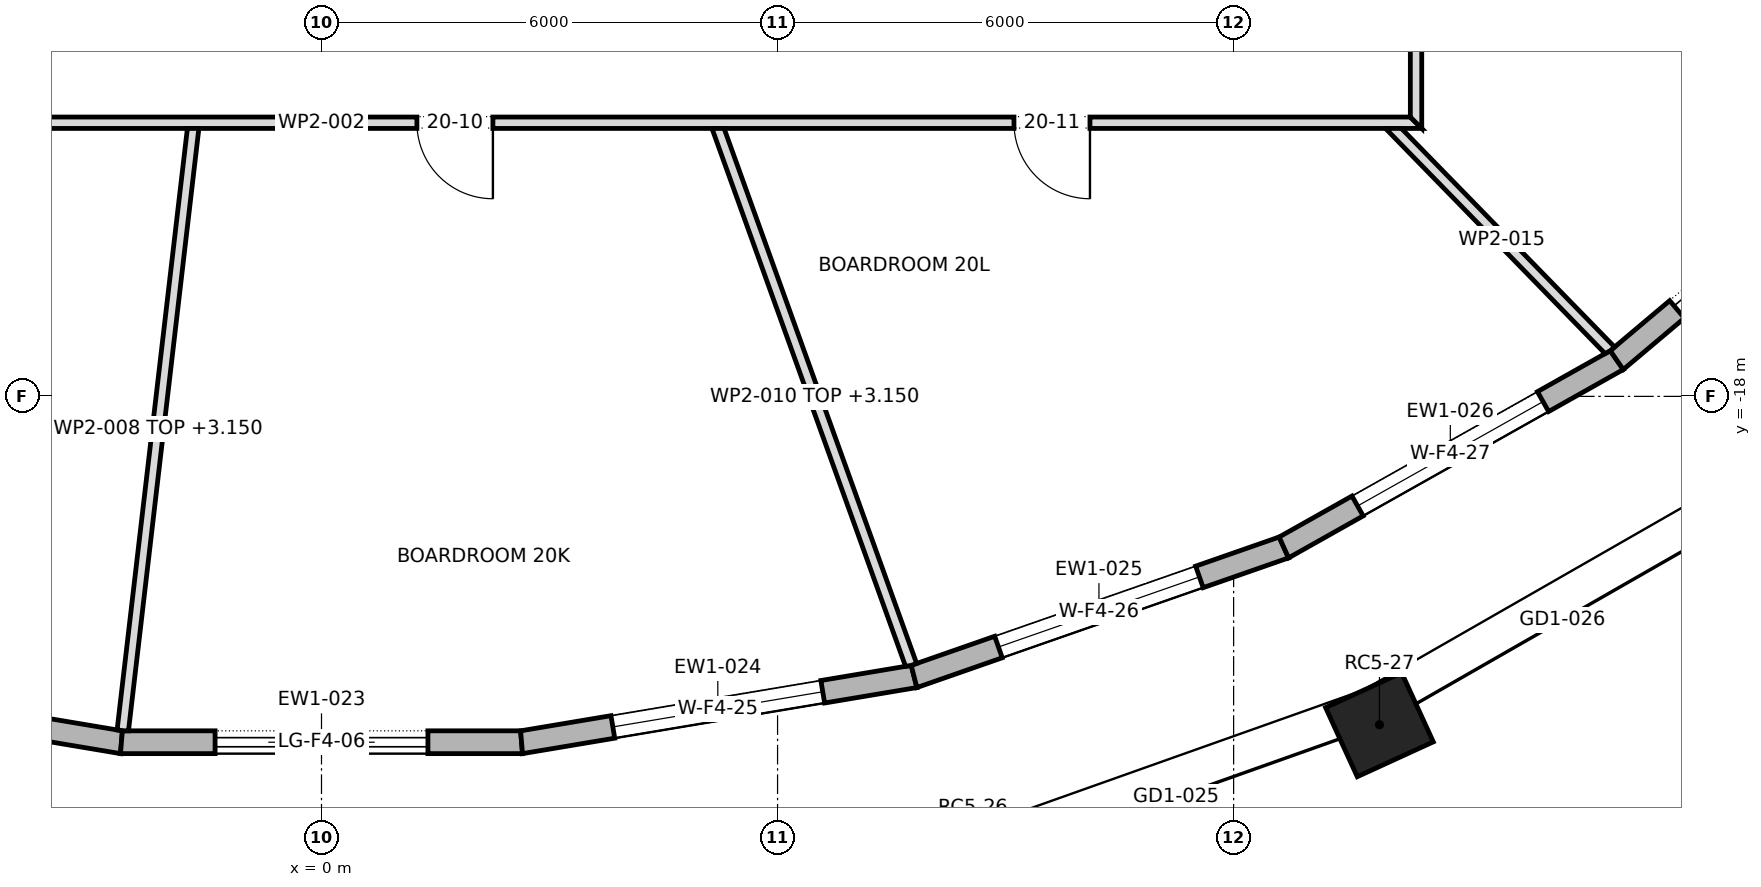
"""IFC4 building model, lengths in metres.
Left out: names, types, materials, properties, quantities, classifications, styles, units other than length and angle.
Written with IfcOpenShell. Run it as: python <this file> out.ifc"""

import sys

from ifc_helpers import new_model, si_unit, direction, frame, frame_2d, origin, origin_2d, place, context, subcontext, project, spatial, polyline, rectangle, outline, extrude, element, fill, save


model = new_model("IFC4")
c1 = context("Model", 3, precision=1e-05, world=origin(), true_north=direction((0.0, 1.0)))
c2 = subcontext(c1, "Body", "Model", "MODEL_VIEW")
j1 = project(units=[si_unit("LENGTHUNIT", "METRE"), si_unit("PLANEANGLEUNIT", "RADIAN")], contexts=[c1])
p1 = place(None, origin())
s1 = spatial("IfcSite", under=j1, at=p1, CompositionType="ELEMENT")
p2 = place(p1, origin())
s2 = spatial("IfcBuilding", under=s1, at=p2, CompositionType="ELEMENT")
p3 = place(p2, frame((0.0, 0.0, 280.3)))
s3 = spatial("IfcBuildingStorey", under=s2, at=p3, CompositionType="ELEMENT", Elevation=280.3)
p4 = place(p3, frame((13.919, -22.32, 0.0), z_axis=(0.0, 0.0, 1.0), x_axis=(0.909129276708, 0.416514055265, 0.0)))
e1 = element("IfcColumn", 1, at=p4, inside=s3, PredefinedType="COLUMN", context=c2, shape_type="SweptSolid", body=[
    extrude(rectangle(XDim=1.1, YDim=1.0, at=origin_2d()), origin(), (0.0, 0.0, 1.0), 4.0),
])
p5 = place(p3, frame((-7.796, -21.685, 0.0), z_axis=(0.0, 0.0, 1.0), x_axis=(0.986257472007, -0.165215613396, 0.0)))
e2 = element("IfcWall", 2, at=p5, inside=s3, PredefinedType="STANDARD", context=c2, shape_type="SweptSolid", body=[
    extrude(outline(polyline([(-0.013, -0.15), (5.248, -0.15), (5.223, 0.15), (0.013, 0.15), (-0.013, -0.15)])), origin(), (0.0, 0.0, 1.0), 3.7),
])
p6 = place(p5, frame((1.218, 0.0, 0.6)))
e3 = element("IfcOpeningElement", 3, at=p6, cuts=e2, PredefinedType="OPENING", context=c2, shape_type="SweptSolid", body=[
    extrude(rectangle(XDim=2.8, YDim=2.65, at=frame_2d((1.4, 1.325))), frame((0.0, 0.162, 0.0), z_axis=(0.0, -1.0, 0.0), x_axis=(1.0, 0.0, 0.0)), (0.0, 0.0, 1.0), 0.324),
])
p7 = place(p3, frame((-2.632, -22.55, 0.0), z_axis=(0.0, 0.0, 1.0), x_axis=(1.0, 0.0, 0.0)))
e4 = element("IfcWall", 4, at=p7, inside=s3, PredefinedType="STANDARD", context=c2, shape_type="SweptSolid", body=[
    extrude(outline(polyline([(-0.012, -0.15), (5.277, -0.15), (5.252, 0.15), (0.012, 0.15), (-0.012, -0.15)])), origin(), (0.0, 0.0, 1.0), 3.7),
])
p8 = place(p7, frame((1.232, 0.0, 0.0)))
e5 = element("IfcOpeningElement", 5, at=p8, cuts=e4, PredefinedType="OPENING", context=c2, shape_type="SweptSolid", body=[
    extrude(rectangle(XDim=2.8, YDim=3.25, at=frame_2d((1.4, 1.625))), frame((0.0, 0.162, 0.0), z_axis=(0.0, -1.0, 0.0), x_axis=(1.0, 0.0, 0.0)), (0.0, 0.0, 1.0), 0.324),
])
p9 = place(p3, frame((2.632, -22.55, 0.0), z_axis=(0.0, 0.0, 1.0), x_axis=(0.986257472007, 0.165215613396, 0.0)))
e6 = element("IfcWall", 6, at=p9, inside=s3, PredefinedType="STANDARD", context=c2, shape_type="SweptSolid", body=[
    extrude(outline(polyline([(-0.012, -0.15), (5.248, -0.15), (5.223, 0.15), (0.012, 0.15), (-0.012, -0.15)])), origin(), (0.0, 0.0, 1.0), 3.7),
])
p10 = place(p9, frame((1.218, 0.0, 0.6)))
e7 = element("IfcOpeningElement", 7, at=p10, cuts=e6, PredefinedType="OPENING", context=c2, shape_type="SweptSolid", body=[
    extrude(rectangle(XDim=2.8, YDim=2.65, at=frame_2d((1.4, 1.325))), frame((0.0, 0.162, 0.0), z_axis=(0.0, -1.0, 0.0), x_axis=(1.0, 0.0, 0.0)), (0.0, 0.0, 1.0), 0.324),
])
p11 = place(p3, frame((7.796, -21.685, 0.0), z_axis=(0.0, 0.0, 1.0), x_axis=(0.944204293701, 0.329360367617, 0.0)))
e8 = element("IfcWall", 8, at=p11, inside=s3, PredefinedType="STANDARD", context=c2, shape_type="SweptSolid", body=[
    extrude(outline(polyline([(-0.013, -0.15), (5.166, -0.15), (5.139, 0.15), (0.013, 0.15), (-0.013, -0.15)])), origin(), (0.0, 0.0, 1.0), 3.7),
])
p12 = place(p11, frame((1.176, 0.0, 0.6)))
e9 = element("IfcOpeningElement", 9, at=p12, cuts=e8, PredefinedType="OPENING", context=c2, shape_type="SweptSolid", body=[
    extrude(rectangle(XDim=2.8, YDim=2.65, at=frame_2d((1.4, 1.325))), frame((0.0, 0.162, 0.0), z_axis=(0.0, -1.0, 0.0), x_axis=(1.0, 0.0, 0.0)), (0.0, 0.0, 1.0), 0.324),
])
p13 = place(p3, frame((12.661, -19.988, 0.0), z_axis=(0.0, 0.0, 1.0), x_axis=(0.871488606878, 0.490415750239, 0.0)))
e10 = element("IfcWall", 10, at=p13, inside=s3, PredefinedType="STANDARD", context=c2, shape_type="SweptSolid", body=[
    extrude(outline(polyline([(-0.013, -0.15), (5.04, -0.15), (5.012, 0.15), (0.013, 0.15), (-0.013, -0.15)])), origin(), (0.0, 0.0, 1.0), 3.7),
])
p14 = place(p13, frame((1.113, 0.0, 0.6)))
e11 = element("IfcOpeningElement", 11, at=p14, cuts=e10, PredefinedType="OPENING", context=c2, shape_type="SweptSolid", body=[
    extrude(rectangle(XDim=2.8, YDim=2.65, at=frame_2d((1.4, 1.325))), frame((0.0, 0.162, 0.0), z_axis=(0.0, -1.0, 0.0), x_axis=(1.0, 0.0, 0.0)), (0.0, 0.0, 1.0), 0.324),
])
p15 = place(p3, frame((17.041, -17.523, 0.0), z_axis=(0.0, 0.0, 1.0), x_axis=(0.764876116592, 0.644177402792, 0.0)))
e12 = element("IfcWall", 12, at=p15, inside=s3, PredefinedType="STANDARD", context=c2, shape_type="SweptSolid", body=[
    extrude(outline(polyline([(-0.014, -0.15), (4.888, -0.15), (4.858, 0.15), (0.014, 0.15), (-0.014, -0.15)])), origin(), (0.0, 0.0, 1.0), 3.7),
])
p16 = place(p15, frame((1.036, 0.0, 0.0)))
e13 = element("IfcOpeningElement", 13, at=p16, cuts=e12, PredefinedType="OPENING", context=c2, shape_type="SweptSolid", body=[
    extrude(rectangle(XDim=2.8, YDim=3.25, at=frame_2d((1.4, 1.625))), frame((0.0, 0.162, 0.0), z_axis=(0.0, -1.0, 0.0), x_axis=(1.0, 0.0, 0.0)), (0.0, 0.0, 1.0), 0.324),
])
p17 = place(p3, frame((-14.475, -14.4, 0.0), z_axis=(0.0, 0.0, 1.0), x_axis=(1.0, 0.0, 0.0)))
e14 = element("IfcWall", 14, at=p17, inside=s3, PredefinedType="PARTITIONING", context=c2, shape_type="SweptSolid", body=[
    extrude(outline(polyline([(0.0, -0.075), (1.93, -0.075), (3.86, -0.075), (5.79, -0.075), (7.72, -0.075), (9.65, -0.075), (11.58, -0.075), (13.51, -0.075), (15.44, -0.075), (17.37, -0.075), (19.3, -0.075), (21.23, -0.075), (23.16, -0.075), (25.09, -0.075), (27.02, -0.075), (28.95, -0.075), (28.8, 0.075), (26.89, 0.075), (24.98, 0.075), (23.07, 0.075), (21.16, 0.075), (19.25, 0.075), (17.34, 0.075), (15.43, 0.075), (13.52, 0.075), (11.61, 0.075), (9.7, 0.075), (7.79, 0.075), (5.88, 0.075), (3.97, 0.075), (2.06, 0.075), (0.15, 0.075), (0.0, -0.075)])), origin(), (0.0, 0.0, 1.0), 3.7),
])
p18 = place(p17, frame((5.535, 0.0, 0.0)))
e15 = element("IfcOpeningElement", 15, at=p18, cuts=e14, PredefinedType="OPENING", context=c2, shape_type="SweptSolid", body=[
    extrude(rectangle(XDim=1.8, YDim=2.1, at=frame_2d((0.9, 1.05))), frame((0.0, 0.087, 0.0), z_axis=(0.0, -1.0, 0.0), x_axis=(1.0, 0.0, 0.0)), (0.0, 0.0, 1.0), 0.174),
])
p19 = place(p17, frame((15.73, 0.0, 0.0)))
e16 = element("IfcOpeningElement", 16, at=p19, cuts=e14, PredefinedType="OPENING", context=c2, shape_type="SweptSolid", body=[
    extrude(rectangle(XDim=1.0, YDim=2.1, at=frame_2d((0.5, 1.05))), frame((0.0, 0.087, 0.0), z_axis=(0.0, -1.0, 0.0), x_axis=(1.0, 0.0, 0.0)), (0.0, 0.0, 1.0), 0.174),
])
p20 = place(p17, frame((23.585, 0.0, 0.0)))
e17 = element("IfcOpeningElement", 17, at=p20, cuts=e14, PredefinedType="OPENING", context=c2, shape_type="SweptSolid", body=[
    extrude(rectangle(XDim=1.0, YDim=2.1, at=frame_2d((0.5, 1.05))), frame((0.0, 0.087, 0.0), z_axis=(0.0, -1.0, 0.0), x_axis=(1.0, 0.0, 0.0)), (0.0, 0.0, 1.0), 0.174),
])
p21 = place(p3, frame((-1.688, -14.467, 0.0), z_axis=(0.0, 0.0, 1.0), x_axis=(-0.116071250105, -0.993240889663, 0.0)))
e18 = element("IfcWall", 18, at=p21, inside=s3, PredefinedType="PARTITIONING", context=c2, shape_type="SweptSolid", body=[
    extrude(outline(polyline([(7.984, -0.075), (7.984, 0.025), (7.979, 0.075), (5.984, 0.075), (3.989, 0.075), (1.995, 0.075), (0.0, 0.075), (0.0, 0.073), (0.017, -0.075), (2.009, -0.075), (4.001, -0.075), (5.993, -0.075), (7.984, -0.075)])), origin(), (0.0, 0.0, 1.0), 3.15),
])
p22 = place(p3, frame((5.208, -14.45, 0.0), z_axis=(0.0, 0.0, 1.0), x_axis=(0.338585214783, -0.940935732306, 0.0)))
e19 = element("IfcWall", 19, at=p22, inside=s3, PredefinedType="PARTITIONING", context=c2, shape_type="SweptSolid", body=[
    extrude(outline(polyline([(0.0, -0.075), (1.88, -0.075), (3.76, -0.075), (5.64, -0.075), (7.521, -0.075), (7.534, -0.001), (7.534, 0.055), (7.534, 0.075), (5.664, 0.075), (3.794, 0.075), (1.924, 0.075), (0.054, 0.075), (0.0, -0.074), (0.0, -0.075)])), origin(), (0.0, 0.0, 1.0), 3.15),
])
p23 = place(p3, frame((14.4, -14.475, 0.0), z_axis=(0.0, 0.0, 1.0), x_axis=(0.0, 1.0, 0.0)))
e20 = element("IfcWall", 20, at=p23, inside=s3, PredefinedType="PARTITIONING", context=c2, shape_type="SweptSolid", body=[
    extrude(outline(polyline([(0.0, -0.075), (1.93, -0.075), (3.86, -0.075), (5.79, -0.075), (7.72, -0.075), (9.65, -0.075), (11.58, -0.075), (13.51, -0.075), (15.44, -0.075), (17.37, -0.075), (19.3, -0.075), (21.23, -0.075), (23.16, -0.075), (25.09, -0.075), (27.02, -0.075), (28.95, -0.075), (28.8, 0.075), (26.89, 0.075), (24.98, 0.075), (23.07, 0.075), (21.16, 0.075), (19.25, 0.075), (17.34, 0.075), (15.43, 0.075), (13.52, 0.075), (11.61, 0.075), (9.7, 0.075), (7.79, 0.075), (5.88, 0.075), (3.97, 0.075), (2.06, 0.075), (0.15, 0.075), (0.0, -0.075)])), origin(), (0.0, 0.0, 1.0), 3.7),
])
p24 = place(p23, frame((3.535, 0.0, 0.0)))
e21 = element("IfcOpeningElement", 21, at=p24, cuts=e20, PredefinedType="OPENING", context=c2, shape_type="SweptSolid", body=[
    extrude(rectangle(XDim=1.0, YDim=2.1, at=frame_2d((0.5, 1.05))), frame((0.0, 0.087, 0.0), z_axis=(0.0, -1.0, 0.0), x_axis=(1.0, 0.0, 0.0)), (0.0, 0.0, 1.0), 0.174),
])
p25 = place(p23, frame((10.14, 0.0, 0.0)))
e22 = element("IfcOpeningElement", 22, at=p25, cuts=e20, PredefinedType="OPENING", context=c2, shape_type="SweptSolid", body=[
    extrude(rectangle(XDim=1.0, YDim=2.1, at=frame_2d((0.5, 1.05))), frame((0.0, 0.087, 0.0), z_axis=(0.0, -1.0, 0.0), x_axis=(1.0, 0.0, 0.0)), (0.0, 0.0, 1.0), 0.174),
])
p26 = place(p23, frame((20.18, 0.0, 0.0)))
e23 = element("IfcOpeningElement", 23, at=p26, cuts=e20, PredefinedType="OPENING", context=c2, shape_type="SweptSolid", body=[
    extrude(rectangle(XDim=1.8, YDim=2.1, at=frame_2d((0.9, 1.05))), frame((0.0, 0.087, 0.0), z_axis=(0.0, -1.0, 0.0), x_axis=(1.0, 0.0, 0.0)), (0.0, 0.0, 1.0), 0.174),
])
p27 = place(p3, frame((16.958, -17.403, 0.0), z_axis=(0.0, 0.0, 1.0), x_axis=(-0.698164782934, 0.715937103293, 0.0)))
e24 = element("IfcWall", 24, at=p27, inside=s3, PredefinedType="PARTITIONING", context=c2, shape_type="SweptSolid", body=[
    extrude(outline(polyline([(0.0, -0.075), (1.339, -0.075), (2.678, -0.075), (4.016, -0.075), (4.069, -0.021), (4.069, -0.021), (4.162, 0.075), (4.162, 0.075), (2.783, 0.075), (1.404, 0.075), (0.025, 0.075), (0.005, -0.0), (0.0, -0.067), (0.0, -0.075)])), origin(), (0.0, 0.0, 1.0), 3.7),
])
p28 = place(p8, origin())
e25 = element("IfcDoor", 25, at=p28, inside=s3, OperationType="DOUBLE_DOOR_SLIDING", PredefinedType="DOOR", context=c2, shape_type="SweptSolid", body=[
    extrude(rectangle(XDim=2.8, YDim=3.25, at=frame_2d((1.4, 1.625))), frame((0.0, 0.025, 0.0), z_axis=(0.0, -1.0, 0.0), x_axis=(1.0, 0.0, 0.0)), (0.0, 0.0, 1.0), 0.05),
])
fill(e5, e25)
p29 = place(p10, origin())
e26 = element("IfcWindow", 26, at=p29, inside=s3, PartitioningType="DOUBLE_PANEL_VERTICAL", PredefinedType="WINDOW", context=c2, shape_type="SweptSolid", body=[
    extrude(rectangle(XDim=2.8, YDim=2.65, at=frame_2d((1.4, 1.325))), frame((0.0, 0.03, 0.0), z_axis=(0.0, -1.0, 0.0), x_axis=(1.0, 0.0, 0.0)), (0.0, 0.0, 1.0), 0.06),
])
fill(e7, e26)
p30 = place(p12, origin())
e27 = element("IfcWindow", 27, at=p30, inside=s3, PartitioningType="DOUBLE_PANEL_VERTICAL", PredefinedType="WINDOW", context=c2, shape_type="SweptSolid", body=[
    extrude(rectangle(XDim=2.8, YDim=2.65, at=frame_2d((1.4, 1.325))), frame((0.0, 0.03, 0.0), z_axis=(0.0, -1.0, 0.0), x_axis=(1.0, 0.0, 0.0)), (0.0, 0.0, 1.0), 0.06),
])
fill(e9, e27)
p31 = place(p14, origin())
e28 = element("IfcWindow", 28, at=p31, inside=s3, PartitioningType="DOUBLE_PANEL_VERTICAL", PredefinedType="WINDOW", context=c2, shape_type="SweptSolid", body=[
    extrude(rectangle(XDim=2.8, YDim=2.65, at=frame_2d((1.4, 1.325))), frame((0.0, 0.03, 0.0), z_axis=(0.0, -1.0, 0.0), x_axis=(1.0, 0.0, 0.0)), (0.0, 0.0, 1.0), 0.06),
])
fill(e11, e28)
p32 = place(p16, origin())
e29 = element("IfcDoor", 29, at=p32, inside=s3, OperationType="DOUBLE_DOOR_SLIDING", PredefinedType="DOOR", context=c2, shape_type="SweptSolid", body=[
    extrude(rectangle(XDim=2.8, YDim=3.25, at=frame_2d((1.4, 1.625))), frame((0.0, 0.025, 0.0), z_axis=(0.0, -1.0, 0.0), x_axis=(1.0, 0.0, 0.0)), (0.0, 0.0, 1.0), 0.05),
])
fill(e13, e29)
p33 = place(p19, frame((1.0, 0.0, 0.0), z_axis=(0.0, 0.0, 1.0), x_axis=(-1.0, 0.0, 0.0)))
e30 = element("IfcDoor", 30, at=p33, inside=s3, OperationType="SINGLE_SWING_RIGHT", PredefinedType="DOOR", context=c2, shape_type="SweptSolid", body=[
    extrude(rectangle(XDim=1.0, YDim=2.1, at=frame_2d((0.5, 1.05))), frame((0.0, 0.025, 0.0), z_axis=(0.0, -1.0, 0.0), x_axis=(1.0, 0.0, 0.0)), (0.0, 0.0, 1.0), 0.05),
])
fill(e16, e30)
p34 = place(p20, frame((1.0, 0.0, 0.0), z_axis=(0.0, 0.0, 1.0), x_axis=(-1.0, 0.0, 0.0)))
e31 = element("IfcDoor", 31, at=p34, inside=s3, OperationType="SINGLE_SWING_RIGHT", PredefinedType="DOOR", context=c2, shape_type="SweptSolid", body=[
    extrude(rectangle(XDim=1.0, YDim=2.1, at=frame_2d((0.5, 1.05))), frame((0.0, 0.025, 0.0), z_axis=(0.0, -1.0, 0.0), x_axis=(1.0, 0.0, 0.0)), (0.0, 0.0, 1.0), 0.05),
])
fill(e17, e31)
save(model, sys.argv[1])
